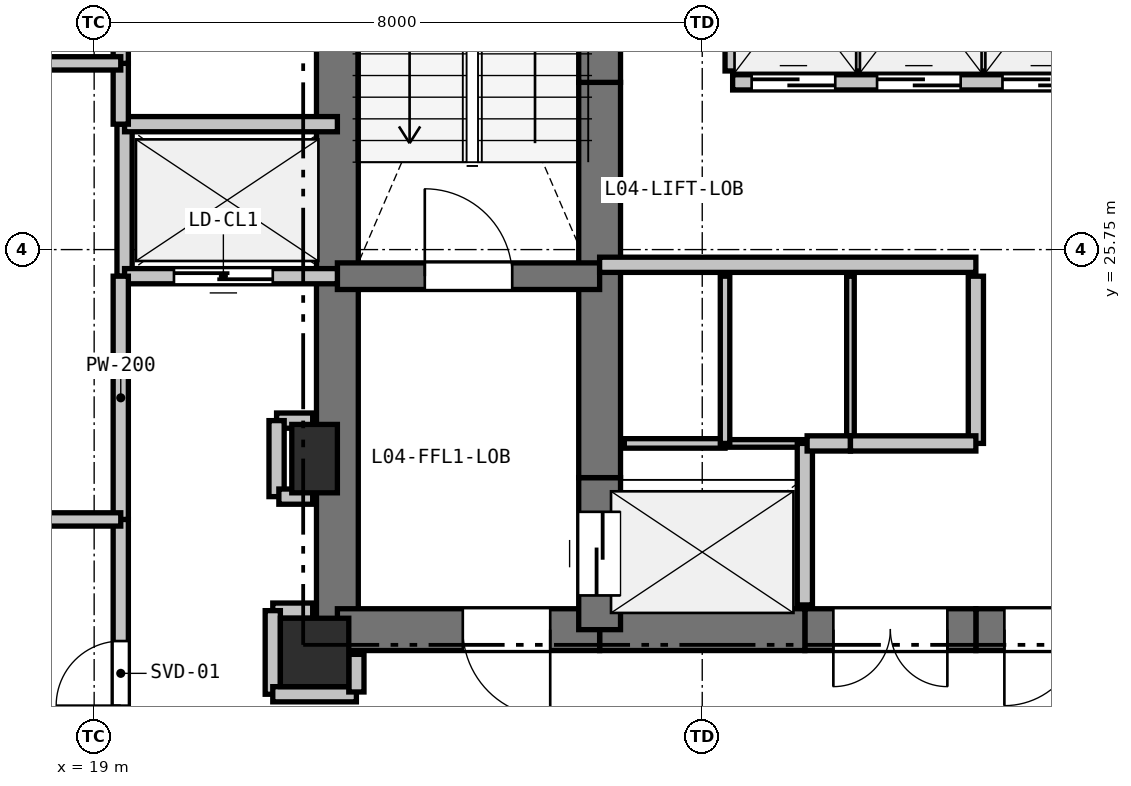
"""IFC4 building model, lengths in metres.
Left out: names, types, materials, properties, quantities, classifications, styles, units other than length and angle.
Written with IfcOpenShell. Run it as: python <this file> out.ifc"""

import sys

from ifc_helpers import new_model, si_unit, direction, frame, frame_2d, origin, origin_2d, place, context, subcontext, project, spatial, rectangle, extrude, element, fill, save


model = new_model("IFC4")
c1 = context("Model", 3, precision=1e-05, world=origin(), true_north=direction((0.0, 1.0)))
c2 = subcontext(c1, "Body", "Model", "MODEL_VIEW")
j1 = project(units=[si_unit("LENGTHUNIT", "METRE"), si_unit("PLANEANGLEUNIT", "RADIAN")], contexts=[c1])
p1 = place(None, origin())
s1 = spatial("IfcSite", under=j1, at=p1, CompositionType="ELEMENT")
p2 = place(p1, origin())
s2 = spatial("IfcBuilding", under=s1, at=p2, CompositionType="ELEMENT")
p3 = place(p2, frame((0.0, 0.0, 19.2)))
s3 = spatial("IfcBuildingStorey", under=s2, at=p3, CompositionType="ELEMENT", Elevation=19.2)
p4 = place(p3, frame((21.9, 20.45, 0.0), z_axis=(0.0, 0.0, 1.0), x_axis=(1.0, 0.0, 0.0)))
e1 = element("IfcColumn", 1, at=p4, inside=s3, PredefinedType="COLUMN", context=c2, shape_type="SweptSolid", body=[
    extrude(rectangle(XDim=0.9, YDim=0.9, at=origin_2d()), origin(), (0.0, 0.0, 1.0), 3.3),
])
p5 = place(p3, frame((21.9, 23.0, 0.0), z_axis=(0.0, 0.0, 1.0), x_axis=(1.0, 0.0, 0.0)))
e2 = element("IfcColumn", 2, at=p5, inside=s3, PredefinedType="PILASTER", context=c2, shape_type="SweptSolid", body=[
    extrude(rectangle(XDim=0.6, YDim=0.9, at=origin_2d()), origin(), (0.0, 0.0, 1.0), 3.3),
])
p6 = place(p3, frame((22.2, 20.75, 0.0), z_axis=(0.0, 0.0, 1.0), x_axis=(0.0, 1.0, 0.0)))
e3 = element("IfcWall", 3, at=p6, inside=s3, PredefinedType="SHEAR", context=c2, shape_type="SweptSolid", body=[
    extrude(rectangle(XDim=4.65, YDim=0.55, at=frame_2d((2.325, 0.0))), origin(), (0.0, 0.0, 1.0), 3.04),
])
p7 = place(p3, frame((22.2, 25.4, 0.0), z_axis=(0.0, 0.0, 1.0), x_axis=(0.0, 1.0, 0.0)))
e4 = element("IfcWall", 4, at=p7, inside=s3, PredefinedType="SHEAR", context=c2, shape_type="SweptSolid", body=[
    extrude(rectangle(XDim=7.35, YDim=0.55, at=frame_2d((3.675, 0.0))), origin(), (0.0, 0.0, 1.0), 3.04),
])
p8 = place(p3, frame((32.35, 20.75, 0.0), z_axis=(0.0, 0.0, 1.0), x_axis=(-1.0, 0.0, 0.0)))
e5 = element("IfcWall", 5, at=p8, inside=s3, PredefinedType="SHEAR", context=c2, shape_type="SweptSolid", body=[
    extrude(rectangle(XDim=1.75, YDim=0.55, at=frame_2d((0.875, 0.0))), origin(), (0.0, 0.0, 1.0), 3.04),
])
p9 = place(p8, frame((0.375, 0.0, 0.0)))
e6 = element("IfcOpeningElement", 6, at=p9, cuts=e5, PredefinedType="OPENING", context=c2, shape_type="SweptSolid", body=[
    extrude(rectangle(XDim=1.0, YDim=2.15, at=frame_2d((0.5, 1.075))), frame((0.0, 0.285, 0.0), z_axis=(0.0, -1.0, 0.0), x_axis=(1.0, 0.0, 0.0)), (0.0, 0.0, 1.0), 0.57),
])
p10 = place(p3, frame((30.6, 20.75, 0.0), z_axis=(0.0, 0.0, 1.0), x_axis=(-1.0, 0.0, 0.0)))
e7 = element("IfcWall", 7, at=p10, inside=s3, PredefinedType="SHEAR", context=c2, shape_type="SweptSolid", body=[
    extrude(rectangle(XDim=2.25, YDim=0.55, at=frame_2d((1.125, 0.0))), origin(), (0.0, 0.0, 1.0), 3.04),
])
p11 = place(p10, frame((0.375, 0.0, 0.0)))
e8 = element("IfcOpeningElement", 8, at=p11, cuts=e7, PredefinedType="OPENING", context=c2, shape_type="SweptSolid", body=[
    extrude(rectangle(XDim=1.5, YDim=2.2, at=frame_2d((0.75, 1.1))), frame((0.0, 0.285, 0.0), z_axis=(0.0, -1.0, 0.0), x_axis=(1.0, 0.0, 0.0)), (0.0, 0.0, 1.0), 0.57),
])
p12 = place(p3, frame((28.35, 20.75, 0.0), z_axis=(0.0, 0.0, 1.0), x_axis=(-1.0, 0.0, 0.0)))
e9 = element("IfcWall", 9, at=p12, inside=s3, PredefinedType="SHEAR", context=c2, shape_type="SweptSolid", body=[
    extrude(rectangle(XDim=2.7, YDim=0.55, at=frame_2d((1.35, 0.0))), origin(), (0.0, 0.0, 1.0), 3.04),
])
p13 = place(p3, frame((25.65, 20.75, 0.0), z_axis=(0.0, 0.0, 1.0), x_axis=(-1.0, 0.0, 0.0)))
e10 = element("IfcWall", 10, at=p13, inside=s3, PredefinedType="SHEAR", context=c2, shape_type="SweptSolid", body=[
    extrude(rectangle(XDim=3.45, YDim=0.55, at=frame_2d((1.725, 0.0))), origin(), (0.0, 0.0, 1.0), 3.04),
])
p14 = place(p13, frame((0.65, 0.0, 0.0)))
e11 = element("IfcOpeningElement", 11, at=p14, cuts=e10, PredefinedType="OPENING", context=c2, shape_type="SweptSolid", body=[
    extrude(rectangle(XDim=1.15, YDim=2.15, at=frame_2d((0.575, 1.075))), frame((0.0, 0.285, 0.0), z_axis=(0.0, -1.0, 0.0), x_axis=(1.0, 0.0, 0.0)), (0.0, 0.0, 1.0), 0.57),
])
p15 = place(p3, frame((25.65, 20.75, 0.0), z_axis=(0.0, 0.0, 1.0), x_axis=(0.0, 1.0, 0.0)))
e12 = element("IfcWall", 12, at=p15, inside=s3, PredefinedType="SHEAR", context=c2, shape_type="SweptSolid", body=[
    extrude(rectangle(XDim=2.0, YDim=0.55, at=frame_2d((1.0, 0.0))), origin(), (0.0, 0.0, 1.0), 3.04),
])
p16 = place(p15, frame((0.45, 0.0, 0.0)))
e13 = element("IfcOpeningElement", 13, at=p16, cuts=e12, PredefinedType="OPENING", context=c2, shape_type="SweptSolid", body=[
    extrude(rectangle(XDim=1.1, YDim=2.15, at=frame_2d((0.55, 1.075))), frame((0.0, 0.285, 0.0), z_axis=(0.0, -1.0, 0.0), x_axis=(1.0, 0.0, 0.0)), (0.0, 0.0, 1.0), 0.57),
])
p17 = place(p3, frame((25.65, 22.75, 0.0), z_axis=(0.0, 0.0, 1.0), x_axis=(0.0, 1.0, 0.0)))
e14 = element("IfcWall", 14, at=p17, inside=s3, PredefinedType="SHEAR", context=c2, shape_type="SweptSolid", body=[
    extrude(rectangle(XDim=2.8, YDim=0.55, at=frame_2d((1.4, 0.0))), origin(), (0.0, 0.0, 1.0), 3.04),
])
p18 = place(p3, frame((25.65, 25.55, 0.0), z_axis=(0.0, 0.0, 1.0), x_axis=(0.0, 1.0, 0.0)))
e15 = element("IfcWall", 15, at=p18, inside=s3, PredefinedType="SHEAR", context=c2, shape_type="SweptSolid", body=[
    extrude(rectangle(XDim=2.4, YDim=0.55, at=frame_2d((1.2, 0.0))), origin(), (0.0, 0.0, 1.0), 3.04),
])
p19 = place(p3, frame((25.65, 27.95, 0.0), z_axis=(0.0, 0.0, 1.0), x_axis=(0.0, 1.0, 0.0)))
e16 = element("IfcWall", 16, at=p19, inside=s3, PredefinedType="SHEAR", context=c2, shape_type="SweptSolid", body=[
    extrude(rectangle(XDim=4.8, YDim=0.55, at=frame_2d((2.4, 0.0))), origin(), (0.0, 0.0, 1.0), 3.04),
])
p20 = place(p3, frame((22.2, 25.4, 0.0), z_axis=(0.0, 0.0, 1.0), x_axis=(1.0, 0.0, 0.0)))
e17 = element("IfcWall", 17, at=p20, inside=s3, PredefinedType="SHEAR", context=c2, shape_type="SweptSolid", body=[
    extrude(rectangle(XDim=3.45, YDim=0.35, at=frame_2d((1.725, 0.0))), origin(), (0.0, 0.0, 1.0), 3.04),
])
p21 = place(p20, frame((1.15, 0.0, 0.0)))
e18 = element("IfcOpeningElement", 18, at=p21, cuts=e17, PredefinedType="OPENING", context=c2, shape_type="SweptSolid", body=[
    extrude(rectangle(XDim=1.15, YDim=2.15, at=frame_2d((0.575, 1.075))), frame((0.0, 0.185, 0.0), z_axis=(0.0, -1.0, 0.0), x_axis=(1.0, 0.0, 0.0)), (0.0, 0.0, 1.0), 0.37),
])
p22 = place(p3, frame((25.65, 25.55, 0.0), z_axis=(0.0, 0.0, 1.0), x_axis=(1.0, 0.0, 0.0)))
e19 = element("IfcWall", 19, at=p22, inside=s3, PredefinedType="PARTITIONING", context=c2, shape_type="SweptSolid", body=[
    extrude(rectangle(XDim=4.95, YDim=0.2, at=frame_2d((2.475, 0.0))), origin(), (0.0, 0.0, 1.0), 3.04),
])
p23 = place(p3, frame((27.4, 27.95, 0.0), z_axis=(0.0, 0.0, 1.0), x_axis=(1.0, 0.0, 0.0)))
e20 = element("IfcWall", 20, at=p23, inside=s3, PredefinedType="PARTITIONING", context=c2, shape_type="SweptSolid", body=[
    extrude(rectangle(XDim=4.95, YDim=0.2, at=frame_2d((2.475, 0.0))), origin(), (0.0, 0.0, 1.0), 3.04),
])
p24 = place(p23, frame((0.25, 0.0, 0.0)))
e21 = element("IfcOpeningElement", 21, at=p24, cuts=e20, PredefinedType="OPENING", context=c2, shape_type="SweptSolid", body=[
    extrude(rectangle(XDim=1.1, YDim=2.15, at=frame_2d((0.55, 1.075))), frame((0.0, 0.11, 0.0), z_axis=(0.0, -1.0, 0.0), x_axis=(1.0, 0.0, 0.0)), (0.0, 0.0, 1.0), 0.22),
])
p25 = place(p23, frame((1.9, 0.0, 0.0)))
e22 = element("IfcOpeningElement", 22, at=p25, cuts=e20, PredefinedType="OPENING", context=c2, shape_type="SweptSolid", body=[
    extrude(rectangle(XDim=1.1, YDim=2.15, at=frame_2d((0.55, 1.075))), frame((0.0, 0.11, 0.0), z_axis=(0.0, -1.0, 0.0), x_axis=(1.0, 0.0, 0.0)), (0.0, 0.0, 1.0), 0.22),
])
p26 = place(p23, frame((3.55, 0.0, 0.0)))
e23 = element("IfcOpeningElement", 23, at=p26, cuts=e20, PredefinedType="OPENING", context=c2, shape_type="SweptSolid", body=[
    extrude(rectangle(XDim=1.1, YDim=2.15, at=frame_2d((0.55, 1.075))), frame((0.0, 0.11, 0.0), z_axis=(0.0, -1.0, 0.0), x_axis=(1.0, 0.0, 0.0)), (0.0, 0.0, 1.0), 0.22),
])
p27 = place(p3, frame((19.4, 25.4, 0.0), z_axis=(0.0, 0.0, 1.0), x_axis=(0.0, 1.0, 0.0)))
e24 = element("IfcWall", 24, at=p27, inside=s3, PredefinedType="PARTITIONING", context=c2, shape_type="SweptSolid", body=[
    extrude(rectangle(XDim=2.0, YDim=0.2, at=frame_2d((1.0, 0.0))), origin(), (0.0, 0.0, 1.0), 3.04),
])
p28 = place(p3, frame((19.4, 27.4, 0.0), z_axis=(0.0, 0.0, 1.0), x_axis=(1.0, 0.0, 0.0)))
e25 = element("IfcWall", 25, at=p28, inside=s3, PredefinedType="PARTITIONING", context=c2, shape_type="SweptSolid", body=[
    extrude(rectangle(XDim=2.8, YDim=0.2, at=frame_2d((1.4, 0.0))), origin(), (0.0, 0.0, 1.0), 2.488),
])
p29 = place(p3, frame((22.2, 25.4, 0.0), z_axis=(0.0, 0.0, 1.0), x_axis=(-1.0, 0.0, 0.0)))
e26 = element("IfcWall", 26, at=p29, inside=s3, PredefinedType="PARTITIONING", context=c2, shape_type="SweptSolid", body=[
    extrude(rectangle(XDim=2.8, YDim=0.2, at=frame_2d((1.4, 0.0))), origin(), (0.0, 0.0, 1.0), 2.488),
])
p30 = place(p29, frame((0.85, 0.0, 0.0)))
e27 = element("IfcOpeningElement", 27, at=p30, cuts=e26, PredefinedType="OPENING", context=c2, shape_type="SweptSolid", body=[
    extrude(rectangle(XDim=1.3, YDim=2.2, at=frame_2d((0.65, 1.1))), frame((0.0, 0.11, 0.0), z_axis=(0.0, -1.0, 0.0), x_axis=(1.0, 0.0, 0.0)), (0.0, 0.0, 1.0), 0.22),
])
p31 = place(p3, frame((25.975, 23.2, 0.0), z_axis=(0.0, 0.0, 1.0), x_axis=(1.0, 0.0, 0.0)))
e28 = element("IfcWall", 28, at=p31, inside=s3, PredefinedType="PARTITIONING", context=c2, shape_type="SweptSolid", body=[
    extrude(rectangle(XDim=1.325, YDim=0.125, at=frame_2d((0.663, 0.0))), origin(), (0.0, 0.0, 1.0), 3.04),
])
p32 = place(p3, frame((27.3, 23.2, 0.0), z_axis=(0.0, 0.0, 1.0), x_axis=(1.0, 0.0, 0.0)))
e29 = element("IfcWall", 29, at=p32, inside=s3, PredefinedType="PARTITIONING", context=c2, shape_type="SweptSolid", body=[
    extrude(rectangle(XDim=1.05, YDim=0.1, at=frame_2d((0.525, 0.0))), origin(), (0.0, 0.0, 1.0), 3.04),
])
p33 = place(p3, frame((28.35, 23.2, 0.0), z_axis=(0.0, 0.0, 1.0), x_axis=(0.0, -1.0, 0.0)))
e30 = element("IfcWall", 30, at=p33, inside=s3, PredefinedType="PARTITIONING", context=c2, shape_type="SweptSolid", body=[
    extrude(rectangle(XDim=2.125, YDim=0.2, at=frame_2d((1.062, 0.0))), origin(), (0.0, 0.0, 1.0), 3.04),
])
p34 = place(p3, frame((27.3, 25.4, 0.0), z_axis=(0.0, 0.0, 1.0), x_axis=(0.0, -1.0, 0.0)))
e31 = element("IfcWall", 31, at=p34, inside=s3, PredefinedType="PARTITIONING", context=c2, shape_type="SweptSolid", body=[
    extrude(rectangle(XDim=2.2, YDim=0.125, at=frame_2d((1.1, 0.0))), origin(), (0.0, 0.0, 1.0), 3.04),
])
p35 = place(p3, frame((28.95, 25.4, 0.0), z_axis=(0.0, 0.0, 1.0), x_axis=(0.0, -1.0, 0.0)))
e32 = element("IfcWall", 32, at=p35, inside=s3, PredefinedType="PARTITIONING", context=c2, shape_type="SweptSolid", body=[
    extrude(rectangle(XDim=2.2, YDim=0.1, at=frame_2d((1.1, 0.0))), origin(), (0.0, 0.0, 1.0), 3.04),
])
p36 = place(p3, frame((28.95, 23.2, 0.0), z_axis=(0.0, 0.0, 1.0), x_axis=(-1.0, 0.0, 0.0)))
e33 = element("IfcWall", 33, at=p36, inside=s3, PredefinedType="PARTITIONING", context=c2, shape_type="SweptSolid", body=[
    extrude(rectangle(XDim=0.57, YDim=0.2, at=frame_2d((0.285, 0.0))), origin(), (0.0, 0.0, 1.0), 3.04),
])
p37 = place(p3, frame((30.6, 25.4, 0.0), z_axis=(0.0, 0.0, 1.0), x_axis=(0.0, -1.0, 0.0)))
e34 = element("IfcWall", 34, at=p37, inside=s3, PredefinedType="PARTITIONING", context=c2, shape_type="SweptSolid", body=[
    extrude(rectangle(XDim=2.2, YDim=0.2, at=frame_2d((1.1, 0.0))), origin(), (0.0, 0.0, 1.0), 3.04),
])
p38 = place(p3, frame((30.6, 23.2, 0.0), z_axis=(0.0, 0.0, 1.0), x_axis=(-1.0, 0.0, 0.0)))
e35 = element("IfcWall", 35, at=p38, inside=s3, PredefinedType="PARTITIONING", context=c2, shape_type="SweptSolid", body=[
    extrude(rectangle(XDim=1.65, YDim=0.2, at=frame_2d((0.825, 0.0))), origin(), (0.0, 0.0, 1.0), 3.04),
])
p39 = place(p3, frame((29.05, 30.3, 0.0), z_axis=(0.0, 0.0, 1.0), x_axis=(0.0, -1.0, 0.0)))
e36 = element("IfcWall", 36, at=p39, inside=s3, PredefinedType="PARTITIONING", context=c2, shape_type="SweptSolid", body=[
    extrude(rectangle(XDim=2.2, YDim=0.1, at=frame_2d((1.1, 0.0))), origin(), (0.0, 0.0, 1.0), 3.04),
])
p40 = place(p3, frame((27.4, 28.1, 0.0), z_axis=(0.0, 0.0, 1.0), x_axis=(0.0, 1.0, 0.0)))
e37 = element("IfcWall", 37, at=p40, inside=s3, PredefinedType="PARTITIONING", context=c2, shape_type="SweptSolid", body=[
    extrude(rectangle(XDim=2.2, YDim=0.2, at=frame_2d((1.1, 0.0))), origin(), (0.0, 0.0, 1.0), 3.04),
])
p41 = place(p3, frame((30.7, 30.3, 0.0), z_axis=(0.0, 0.0, 1.0), x_axis=(0.0, -1.0, 0.0)))
e38 = element("IfcWall", 38, at=p41, inside=s3, PredefinedType="PARTITIONING", context=c2, shape_type="SweptSolid", body=[
    extrude(rectangle(XDim=2.2, YDim=0.125, at=frame_2d((1.1, 0.0))), origin(), (0.0, 0.0, 1.0), 3.04),
])
p42 = place(p3, frame((21.875, 21.0, 0.0), z_axis=(0.0, 0.0, 1.0), x_axis=(-1.0, 0.0, 0.0)))
e39 = element("IfcWall", 39, at=p42, inside=s3, PredefinedType="PARTITIONING", context=c2, shape_type="SweptSolid", body=[
    extrude(rectangle(XDim=0.525, YDim=0.2, at=frame_2d((0.262, 0.0))), origin(), (0.0, 0.0, 1.0), 2.488),
])
p43 = place(p3, frame((21.35, 21.0, 0.0), z_axis=(0.0, 0.0, 1.0), x_axis=(0.0, -1.0, 0.0)))
e40 = element("IfcWall", 40, at=p43, inside=s3, PredefinedType="PARTITIONING", context=c2, shape_type="SweptSolid", body=[
    extrude(rectangle(XDim=1.1, YDim=0.2, at=frame_2d((0.55, 0.0))), origin(), (0.0, 0.0, 1.0), 2.338),
])
p44 = place(p3, frame((21.35, 19.9, 0.0), z_axis=(0.0, 0.0, 1.0), x_axis=(1.0, 0.0, 0.0)))
e41 = element("IfcWall", 41, at=p44, inside=s3, PredefinedType="PARTITIONING", context=c2, shape_type="SweptSolid", body=[
    extrude(rectangle(XDim=1.1, YDim=0.2, at=frame_2d((0.55, 0.0))), origin(), (0.0, 0.0, 1.0), 2.338),
])
p45 = place(p3, frame((22.45, 19.93, 0.0), z_axis=(0.0, 0.0, 1.0), x_axis=(0.0, 1.0, 0.0)))
e42 = element("IfcWall", 42, at=p45, inside=s3, PredefinedType="PARTITIONING", context=c2, shape_type="SweptSolid", body=[
    extrude(rectangle(XDim=0.495, YDim=0.2, at=frame_2d((0.248, 0.0))), origin(), (0.0, 0.0, 1.0), 2.338),
])
p46 = place(p3, frame((19.35, 18.15, 0.0), z_axis=(0.0, 0.0, 1.0), x_axis=(0.0, 1.0, 0.0)))
e43 = element("IfcWall", 43, at=p46, inside=s3, PredefinedType="PARTITIONING", context=c2, shape_type="SweptSolid", body=[
    extrude(rectangle(XDim=4.05, YDim=0.2, at=frame_2d((2.025, 0.0))), origin(), (0.0, 0.0, 1.0), 2.338),
])
p47 = place(p46, frame((1.6, 0.0, 0.0)))
e44 = element("IfcOpeningElement", 44, at=p47, cuts=e43, PredefinedType="OPENING", context=c2, shape_type="SweptSolid", body=[
    extrude(rectangle(XDim=0.85, YDim=2.1, at=frame_2d((0.425, 1.05))), frame((0.0, 0.11, 0.0), z_axis=(0.0, -1.0, 0.0), x_axis=(1.0, 0.0, 0.0)), (0.0, 0.0, 1.0), 0.22),
])
p48 = place(p3, frame((19.35, 22.2, 0.0), z_axis=(0.0, 0.0, 1.0), x_axis=(0.0, 1.0, 0.0)))
e45 = element("IfcWall", 45, at=p48, inside=s3, PredefinedType="PARTITIONING", context=c2, shape_type="SweptSolid", body=[
    extrude(rectangle(XDim=3.2, YDim=0.2, at=frame_2d((1.6, 0.0))), origin(), (0.0, 0.0, 1.0), 3.04),
])
p49 = place(p3, frame((19.35, 27.4, 0.0), z_axis=(0.0, 0.0, 1.0), x_axis=(0.0, 1.0, 0.0)))
e46 = element("IfcWall", 46, at=p49, inside=s3, PredefinedType="PARTITIONING", context=c2, shape_type="SweptSolid", body=[
    extrude(rectangle(XDim=0.8, YDim=0.2, at=frame_2d((0.4, 0.0))), origin(), (0.0, 0.0, 1.0), 3.04),
])
p50 = place(p3, frame((19.35, 28.2, 0.0), z_axis=(0.0, 0.0, 1.0), x_axis=(0.0, 1.0, 0.0)))
e47 = element("IfcWall", 47, at=p50, inside=s3, PredefinedType="PARTITIONING", context=c2, shape_type="SweptSolid", body=[
    extrude(rectangle(XDim=4.3, YDim=0.2, at=frame_2d((2.15, 0.0))), origin(), (0.0, 0.0, 1.0), 3.04),
])
p51 = place(p50, frame((1.725, 0.0, 0.0)))
e48 = element("IfcOpeningElement", 48, at=p51, cuts=e47, PredefinedType="OPENING", context=c2, shape_type="SweptSolid", body=[
    extrude(rectangle(XDim=0.85, YDim=2.1, at=frame_2d((0.425, 1.05))), frame((0.0, 0.11, 0.0), z_axis=(0.0, -1.0, 0.0), x_axis=(1.0, 0.0, 0.0)), (0.0, 0.0, 1.0), 0.22),
])
p52 = place(p3, frame((21.875, 23.5, 0.0), z_axis=(0.0, 0.0, 1.0), x_axis=(-1.0, 0.0, 0.0)))
e49 = element("IfcWall", 49, at=p52, inside=s3, PredefinedType="PARTITIONING", context=c2, shape_type="SweptSolid", body=[
    extrude(rectangle(XDim=0.475, YDim=0.2, at=frame_2d((0.238, 0.0))), origin(), (0.0, 0.0, 1.0), 2.488),
])
p53 = place(p3, frame((21.4, 23.5, 0.0), z_axis=(0.0, 0.0, 1.0), x_axis=(0.0, -1.0, 0.0)))
e50 = element("IfcWall", 50, at=p53, inside=s3, PredefinedType="PARTITIONING", context=c2, shape_type="SweptSolid", body=[
    extrude(rectangle(XDim=1.0, YDim=0.2, at=frame_2d((0.5, 0.0))), origin(), (0.0, 0.0, 1.0), 3.04),
])
p54 = place(p3, frame((21.43, 22.5, 0.0), z_axis=(0.0, 0.0, 1.0), x_axis=(1.0, 0.0, 0.0)))
e51 = element("IfcWall", 51, at=p54, inside=s3, PredefinedType="PARTITIONING", context=c2, shape_type="SweptSolid", body=[
    extrude(rectangle(XDim=0.445, YDim=0.2, at=frame_2d((0.223, 0.0))), origin(), (0.0, 0.0, 1.0), 2.488),
])
p55 = place(p3, frame((7.474, 22.2, 0.0), z_axis=(0.0, 0.0, 1.0), x_axis=(1.0, 0.0, 0.0)))
e52 = element("IfcWall", 52, at=p55, inside=s3, PredefinedType="PLUMBINGWALL", context=c2, shape_type="SweptSolid", body=[
    extrude(rectangle(XDim=11.876, YDim=0.175, at=frame_2d((5.938, 0.0))), origin(), (0.0, 0.0, 1.0), 2.338),
])
p56 = place(p3, frame((19.35, 28.2, 0.0), z_axis=(0.0, 0.0, 1.0), x_axis=(-1.0, 0.0, 0.0)))
e53 = element("IfcWall", 53, at=p56, inside=s3, PredefinedType="PLUMBINGWALL", context=c2, shape_type="SweptSolid", body=[
    extrude(rectangle(XDim=15.375, YDim=0.175, at=frame_2d((7.688, 0.0))), origin(), (0.0, 0.0, 1.0), 2.65),
])
p57 = place(p24, origin())
e54 = element("IfcDoor", 54, at=p57, inside=s3, OperationType="SLIDING_TO_LEFT", PredefinedType="DOOR", context=c2, shape_type="SweptSolid", body=[
    extrude(rectangle(XDim=1.1, YDim=2.15, at=frame_2d((0.55, 1.075))), frame((0.0, 0.025, 0.0), z_axis=(0.0, -1.0, 0.0), x_axis=(1.0, 0.0, 0.0)), (0.0, 0.0, 1.0), 0.05),
])
fill(e21, e54)
p58 = place(p25, origin())
e55 = element("IfcDoor", 55, at=p58, inside=s3, OperationType="SLIDING_TO_LEFT", PredefinedType="DOOR", context=c2, shape_type="SweptSolid", body=[
    extrude(rectangle(XDim=1.1, YDim=2.15, at=frame_2d((0.55, 1.075))), frame((0.0, 0.025, 0.0), z_axis=(0.0, -1.0, 0.0), x_axis=(1.0, 0.0, 0.0)), (0.0, 0.0, 1.0), 0.05),
])
fill(e22, e55)
p59 = place(p26, origin())
e56 = element("IfcDoor", 56, at=p59, inside=s3, OperationType="SLIDING_TO_LEFT", PredefinedType="DOOR", context=c2, shape_type="SweptSolid", body=[
    extrude(rectangle(XDim=1.1, YDim=2.15, at=frame_2d((0.55, 1.075))), frame((0.0, 0.025, 0.0), z_axis=(0.0, -1.0, 0.0), x_axis=(1.0, 0.0, 0.0)), (0.0, 0.0, 1.0), 0.05),
])
fill(e23, e56)
p60 = place(p9, origin())
e57 = element("IfcDoor", 57, at=p60, inside=s3, OperationType="SINGLE_SWING_RIGHT", PredefinedType="DOOR", context=c2, shape_type="SweptSolid", body=[
    extrude(rectangle(XDim=1.0, YDim=2.15, at=frame_2d((0.5, 1.075))), frame((0.0, 0.025, 0.0), z_axis=(0.0, -1.0, 0.0), x_axis=(1.0, 0.0, 0.0)), (0.0, 0.0, 1.0), 0.05),
])
fill(e6, e57)
p61 = place(p16, origin())
e58 = element("IfcDoor", 58, at=p61, inside=s3, OperationType="SLIDING_TO_LEFT", PredefinedType="DOOR", context=c2, shape_type="SweptSolid", body=[
    extrude(rectangle(XDim=1.1, YDim=2.15, at=frame_2d((0.55, 1.075))), frame((0.0, 0.025, 0.0), z_axis=(0.0, -1.0, 0.0), x_axis=(1.0, 0.0, 0.0)), (0.0, 0.0, 1.0), 0.05),
])
fill(e13, e58)
p62 = place(p30, origin())
e59 = element("IfcDoor", 59, at=p62, inside=s3, OperationType="SLIDING_TO_LEFT", PredefinedType="DOOR", context=c2, shape_type="SweptSolid", body=[
    extrude(rectangle(XDim=1.3, YDim=2.2, at=frame_2d((0.65, 1.1))), frame((0.0, 0.025, 0.0), z_axis=(0.0, -1.0, 0.0), x_axis=(1.0, 0.0, 0.0)), (0.0, 0.0, 1.0), 0.05),
])
fill(e27, e59)
p63 = place(p21, origin())
e60 = element("IfcDoor", 60, at=p63, inside=s3, OperationType="SINGLE_SWING_LEFT", PredefinedType="DOOR", context=c2, shape_type="SweptSolid", body=[
    extrude(rectangle(XDim=1.15, YDim=2.15, at=frame_2d((0.575, 1.075))), frame((0.0, 0.025, 0.0), z_axis=(0.0, -1.0, 0.0), x_axis=(1.0, 0.0, 0.0)), (0.0, 0.0, 1.0), 0.05),
])
fill(e18, e60)
p64 = place(p14, origin())
e61 = element("IfcDoor", 61, at=p64, inside=s3, OperationType="SINGLE_SWING_LEFT", PredefinedType="DOOR", context=c2, shape_type="SweptSolid", body=[
    extrude(rectangle(XDim=1.15, YDim=2.15, at=frame_2d((0.575, 1.075))), frame((0.0, 0.025, 0.0), z_axis=(0.0, -1.0, 0.0), x_axis=(1.0, 0.0, 0.0)), (0.0, 0.0, 1.0), 0.05),
])
fill(e11, e61)
p65 = place(p11, origin())
e62 = element("IfcDoor", 62, at=p65, inside=s3, OperationType="DOUBLE_DOOR_SINGLE_SWING", PredefinedType="DOOR", context=c2, shape_type="SweptSolid", body=[
    extrude(rectangle(XDim=1.5, YDim=2.2, at=frame_2d((0.75, 1.1))), frame((0.0, 0.025, 0.0), z_axis=(0.0, -1.0, 0.0), x_axis=(1.0, 0.0, 0.0)), (0.0, 0.0, 1.0), 0.05),
])
fill(e8, e62)
p66 = place(p47, origin())
e63 = element("IfcDoor", 63, at=p66, inside=s3, OperationType="SINGLE_SWING_LEFT", PredefinedType="DOOR", context=c2, shape_type="SweptSolid", body=[
    extrude(rectangle(XDim=0.85, YDim=2.1, at=frame_2d((0.425, 1.05))), frame((0.0, 0.025, 0.0), z_axis=(0.0, -1.0, 0.0), x_axis=(1.0, 0.0, 0.0)), (0.0, 0.0, 1.0), 0.05),
])
fill(e44, e63)
save(model, sys.argv[1])
